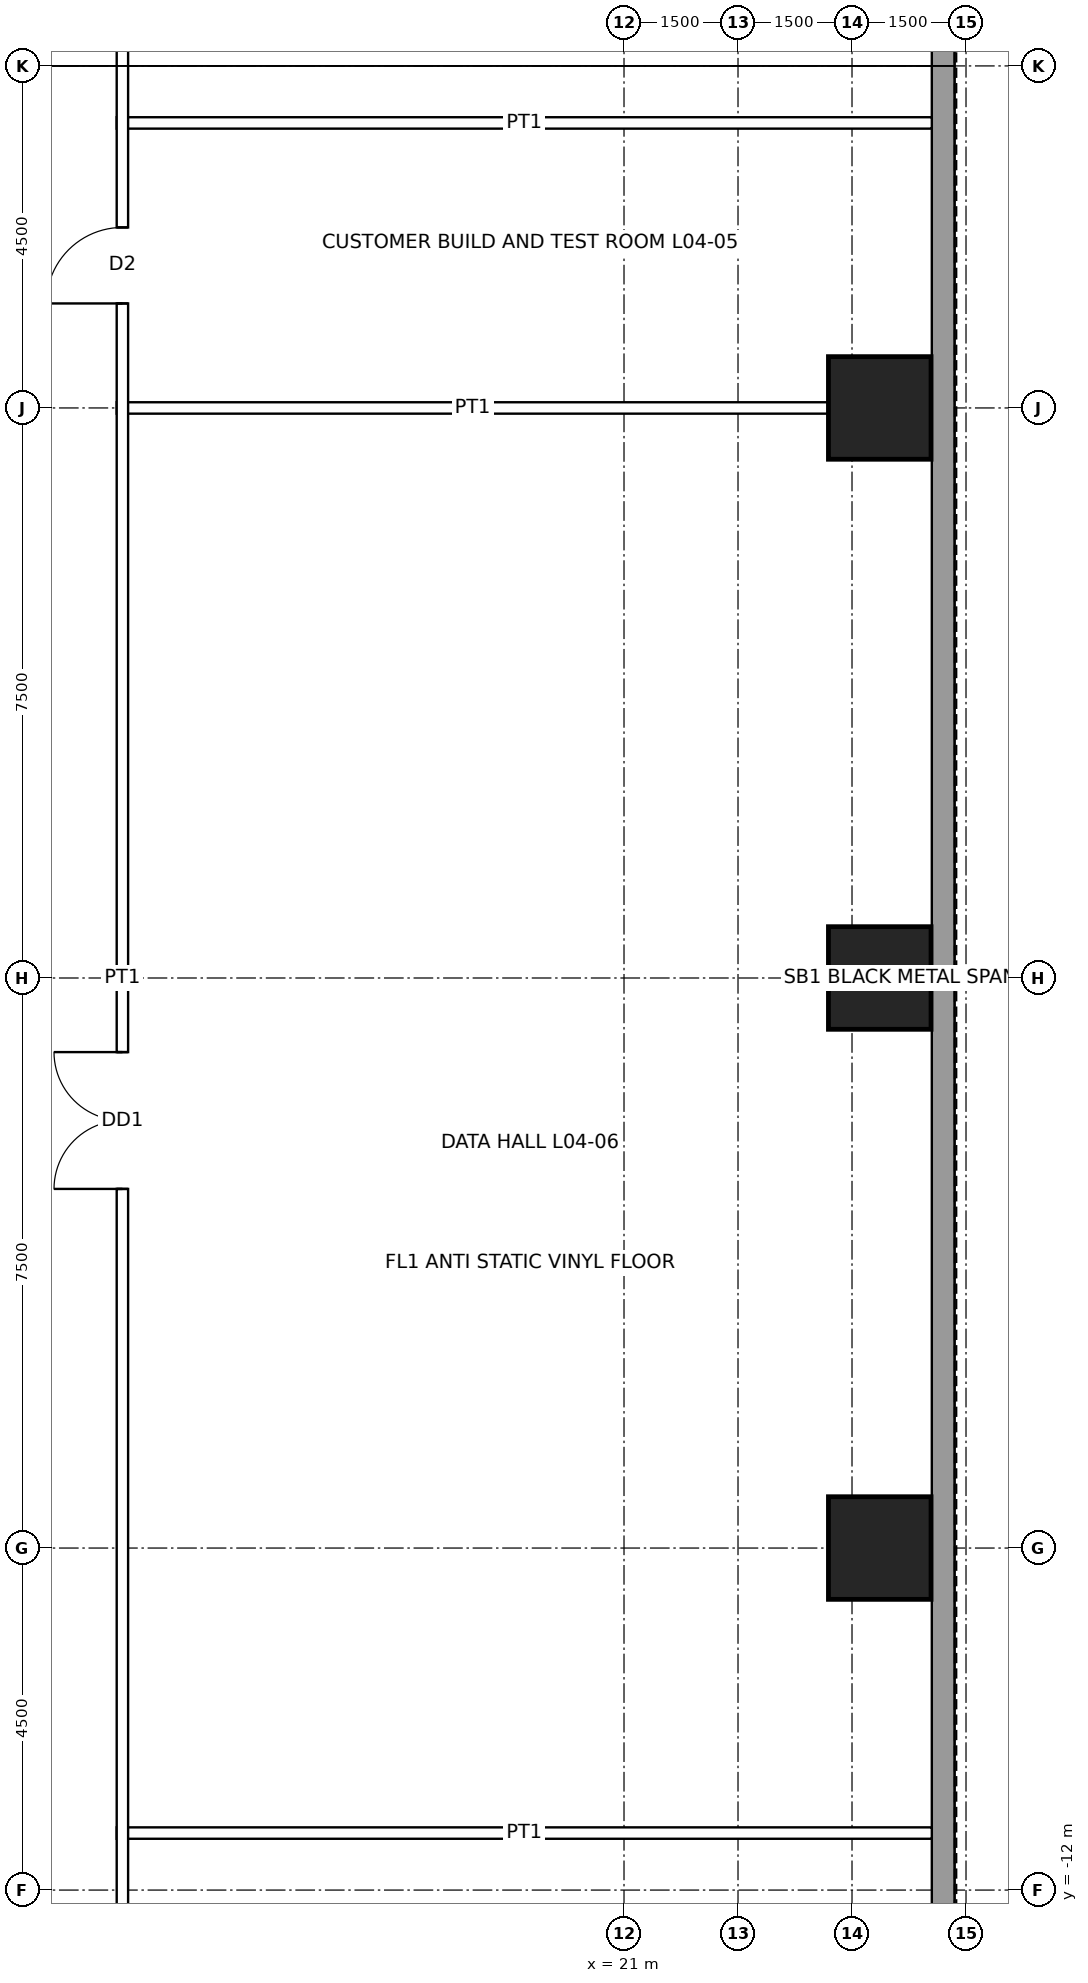
"""IFC4 building model, lengths in metres.
Left out: names, types, materials, properties, quantities, classifications, styles, units other than length and angle.
Written with IfcOpenShell. Run it as: python <this file> out.ifc"""

import sys

from ifc_helpers import new_model, si_unit, direction, frame, frame_2d, origin, origin_2d, place, context, subcontext, project, spatial, rectangle, hollow_rectangle, extrude, element, fill, save


model = new_model("IFC4")
c1 = context("Model", 3, precision=1e-05, world=origin(), true_north=direction((0.0, 1.0)))
c2 = subcontext(c1, "Body", "Model", "MODEL_VIEW")
j1 = project(units=[si_unit("LENGTHUNIT", "METRE"), si_unit("PLANEANGLEUNIT", "RADIAN")], contexts=[c1])
p1 = place(None, origin())
s1 = spatial("IfcSite", under=j1, at=p1, CompositionType="ELEMENT")
p2 = place(p1, origin())
s2 = spatial("IfcBuilding", under=s1, at=p2, CompositionType="ELEMENT")
p3 = place(p2, frame((0.0, 0.0, 23.4)))
s3 = spatial("IfcBuildingStorey", under=s2, at=p3, CompositionType="ELEMENT", Elevation=23.4)
for number, where, z_axis, x_axis in (
    (1, (24.365, 7.5, 0.0), (0.0, 0.0, 1.0), (1.0, 0.0, 0.0)),
    (2, (24.365, 0.0, 0.0), (0.0, 0.0, 1.0), (1.0, 0.0, 0.0)),
    (3, (24.365, -7.5, 0.0), (0.0, 0.0, 1.0), (1.0, 0.0, 0.0)),
):
    element("IfcColumn", number, at=place(p3, frame(where, z_axis=z_axis, x_axis=x_axis)), inside=s3, PredefinedType="COLUMN", context=c2, shape_type="SweptSolid", body=[
        extrude(hollow_rectangle(XDim=1.35, YDim=1.35, WallThickness=0.085, at=origin_2d()), origin(), (0.0, 0.0, 1.0), 5.0),
    ])
p4 = place(p3, frame((25.2, 17.7, 0.0), z_axis=(0.0, 0.0, 1.0), x_axis=(0.0, -1.0, 0.0)))
e4 = element("IfcWall", 4, at=p4, inside=s3, PredefinedType="SOLIDWALL", context=c2, shape_type="SweptSolid", body=[
    extrude(rectangle(XDim=35.4, YDim=0.3, at=frame_2d((17.7, 0.0))), origin(), (0.0, 0.0, 1.0), 4.8),
])
p5 = place(p3, frame((14.325, -11.25, 0.0), z_axis=(0.0, 0.0, 1.0), x_axis=(1.0, 0.0, 0.0)))
e5 = element("IfcWall", 5, at=p5, inside=s3, PredefinedType="PARTITIONING", context=c2, shape_type="SweptSolid", body=[
    extrude(rectangle(XDim=10.725, YDim=0.15, at=frame_2d((5.363, 0.0))), origin(), (0.0, 0.0, 1.0), 3.853),
])
p6 = place(p3, frame((14.325, 7.5, 0.0), z_axis=(0.0, 0.0, 1.0), x_axis=(1.0, 0.0, 0.0)))
e6 = element("IfcWall", 6, at=p6, inside=s3, PredefinedType="PARTITIONING", context=c2, shape_type="SweptSolid", body=[
    extrude(rectangle(XDim=9.365, YDim=0.15, at=frame_2d((4.683, 0.0))), origin(), (0.0, 0.0, 1.0), 3.853),
])
p7 = place(p3, frame((14.325, 11.25, 0.0), z_axis=(0.0, 0.0, 1.0), x_axis=(1.0, 0.0, 0.0)))
e7 = element("IfcWall", 7, at=p7, inside=s3, PredefinedType="PARTITIONING", context=c2, shape_type="SweptSolid", body=[
    extrude(rectangle(XDim=10.725, YDim=0.15, at=frame_2d((5.363, 0.0))), origin(), (0.0, 0.0, 1.0), 3.853),
])
p8 = place(p3, frame((14.4, -14.475, 0.0), z_axis=(0.0, 0.0, 1.0), x_axis=(0.0, 1.0, 0.0)))
e8 = element("IfcWall", 8, at=p8, inside=s3, PredefinedType="PARTITIONING", context=c2, shape_type="SweptSolid", body=[
    extrude(rectangle(XDim=28.95, YDim=0.15, at=frame_2d((14.475, 0.0))), origin(), (0.0, 0.0, 1.0), 4.8),
])
p9 = place(p8, frame((23.35, 0.0, 0.0)))
e9 = element("IfcOpeningElement", 9, at=p9, cuts=e8, PredefinedType="OPENING", context=c2, shape_type="SweptSolid", body=[
    extrude(rectangle(XDim=1.0, YDim=2.1, at=frame_2d((0.5, 1.05))), frame((0.0, 0.085, 0.0), z_axis=(0.0, -1.0, 0.0), x_axis=(1.0, 0.0, 0.0)), (0.0, 0.0, 1.0), 0.17),
])
p10 = place(p8, frame((11.7, 0.0, 0.0)))
e10 = element("IfcOpeningElement", 10, at=p10, cuts=e8, PredefinedType="OPENING", context=c2, shape_type="SweptSolid", body=[
    extrude(rectangle(XDim=1.8, YDim=2.4, at=frame_2d((0.9, 1.2))), frame((0.0, 0.085, 0.0), z_axis=(0.0, -1.0, 0.0), x_axis=(1.0, 0.0, 0.0)), (0.0, 0.0, 1.0), 0.17),
])
p11 = place(p9, origin())
e11 = element("IfcDoor", 11, at=p11, inside=s3, OperationType="SINGLE_SWING_LEFT", PredefinedType="DOOR", context=c2, shape_type="SweptSolid", body=[
    extrude(rectangle(XDim=1.0, YDim=2.1, at=frame_2d((0.5, 1.05))), frame((0.0, 0.025, 0.0), z_axis=(0.0, -1.0, 0.0), x_axis=(1.0, 0.0, 0.0)), (0.0, 0.0, 1.0), 0.05),
])
fill(e9, e11)
p12 = place(p10, origin())
e12 = element("IfcDoor", 12, at=p12, inside=s3, OperationType="DOUBLE_DOOR_SINGLE_SWING", PredefinedType="DOOR", context=c2, shape_type="SweptSolid", body=[
    extrude(rectangle(XDim=1.8, YDim=2.4, at=frame_2d((0.9, 1.2))), frame((0.0, 0.025, 0.0), z_axis=(0.0, -1.0, 0.0), x_axis=(1.0, 0.0, 0.0)), (0.0, 0.0, 1.0), 0.05),
])
fill(e10, e12)
save(model, sys.argv[1])
